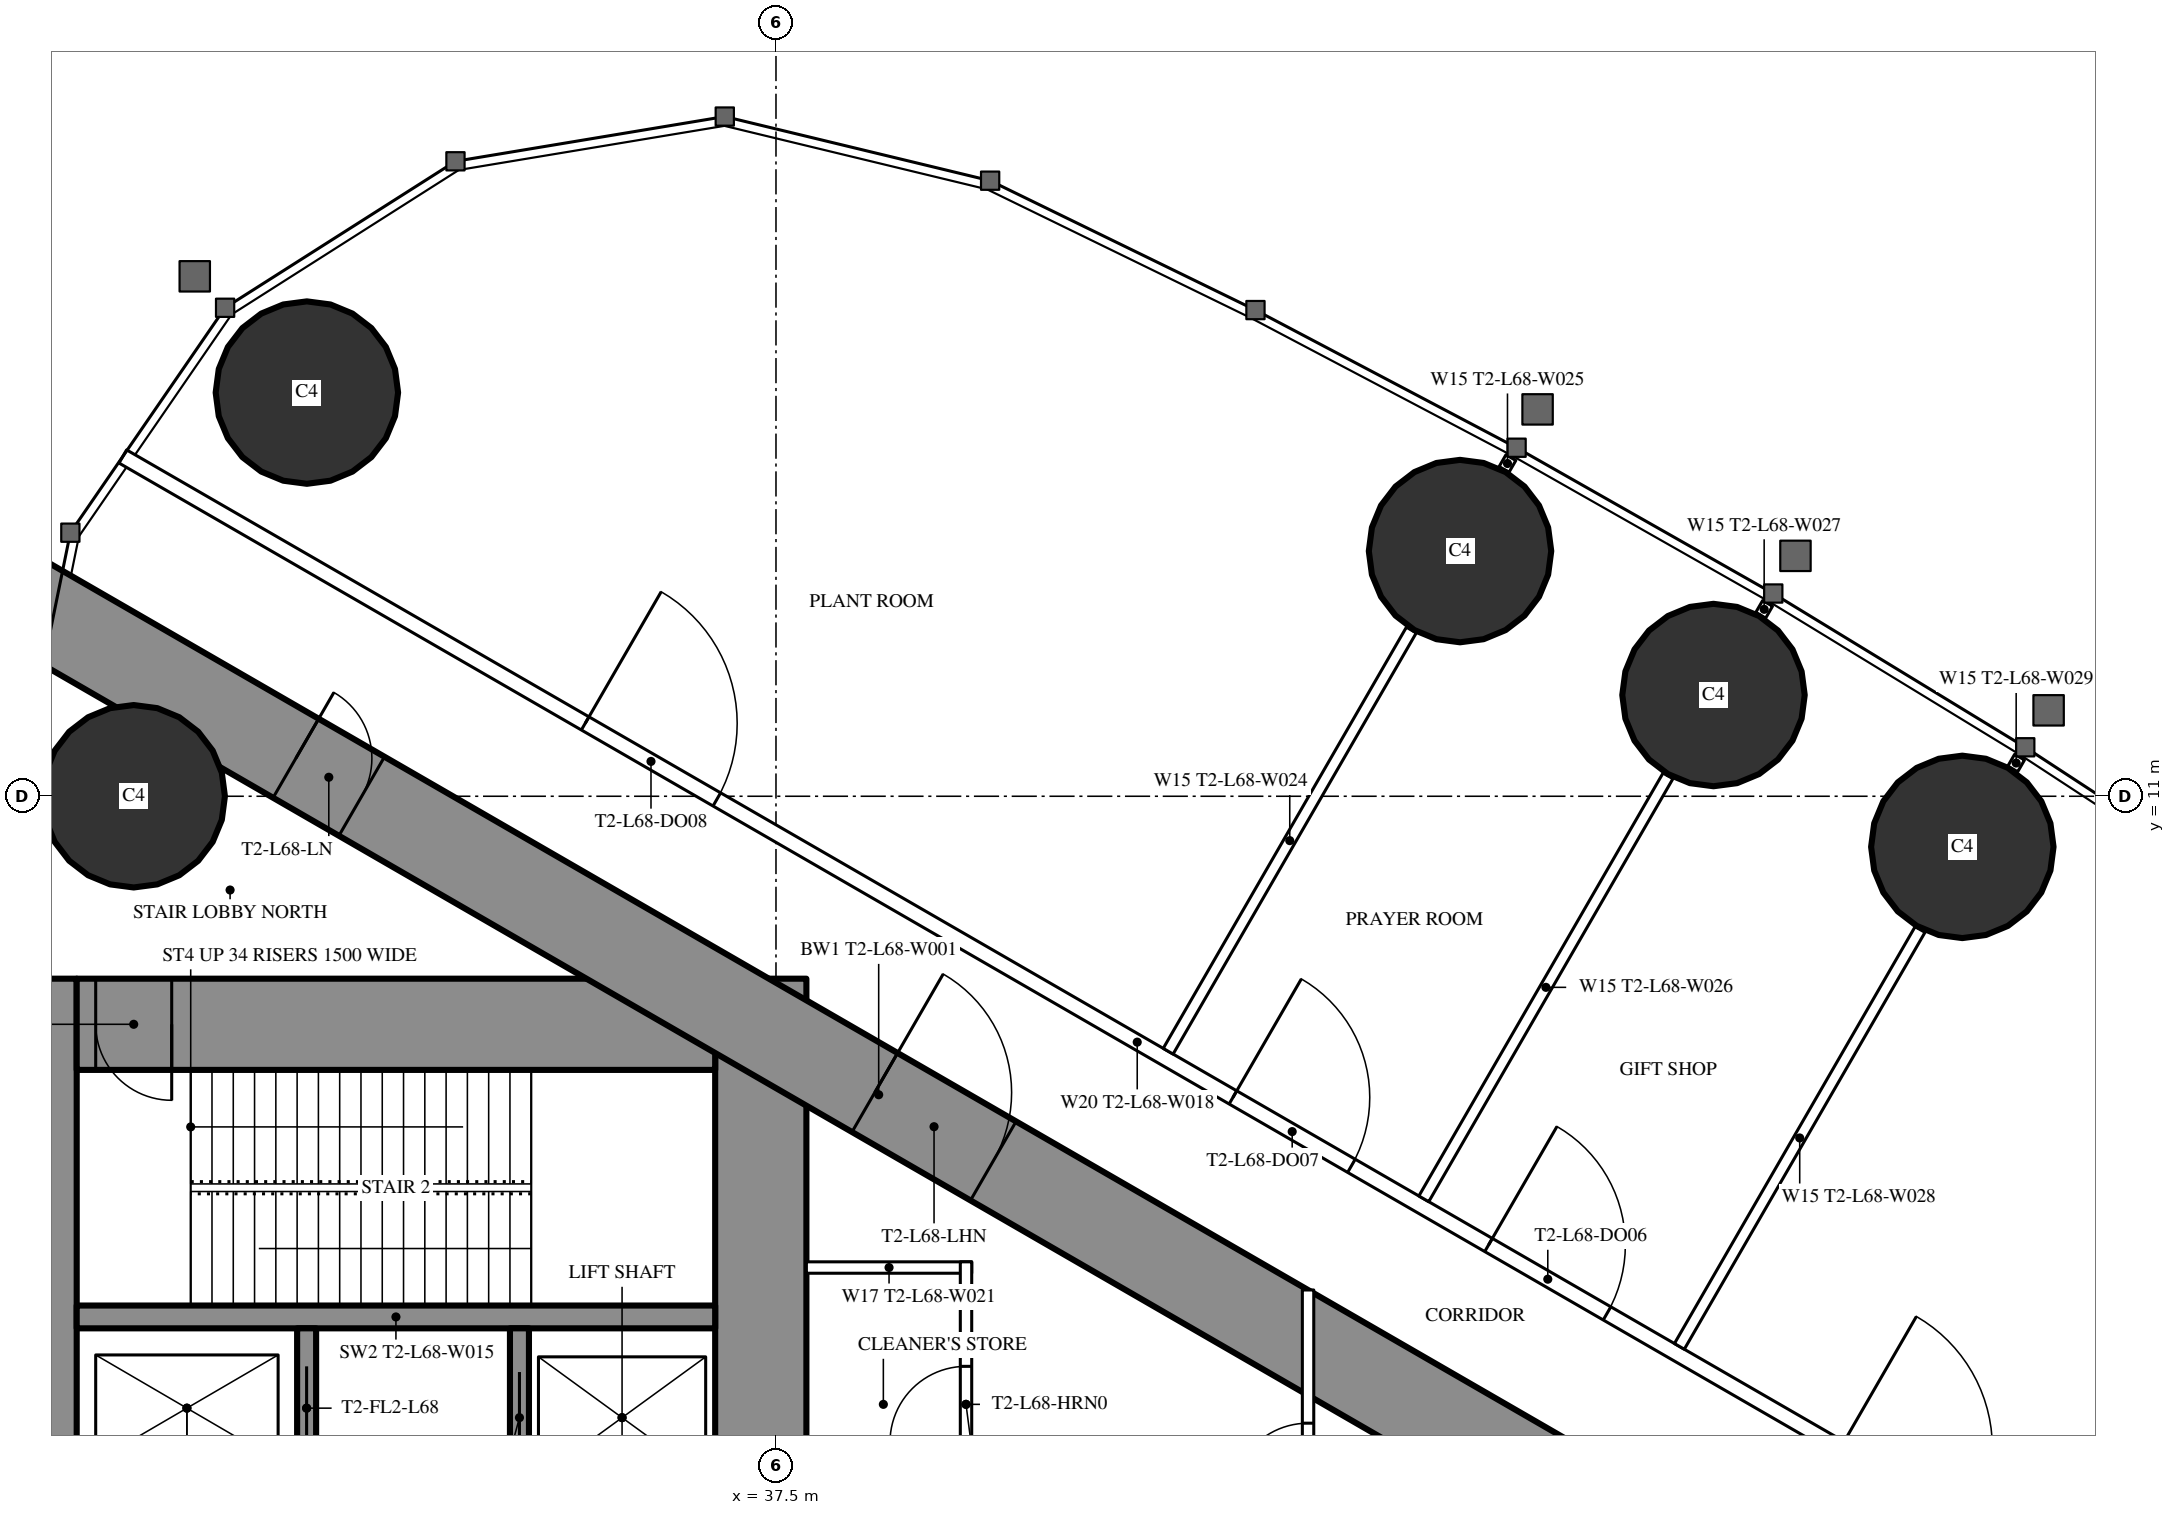
"""IFC4 building model, lengths in metres.
Left out: names, types, materials, properties, quantities, classifications, styles, units other than length and angle.
Written with IfcOpenShell. Run it as: python <this file> out.ifc"""

import sys

from ifc_helpers import new_model, si_unit, direction, frame, frame_2d, origin, origin_2d, place, context, subcontext, project, spatial, rectangle, circle, extrude, element, fill, save


model = new_model("IFC4")
c1 = context("Model", 3, precision=1e-05, world=origin(), true_north=direction((0.0, 1.0)))
c2 = subcontext(c1, "Body", "Model", "MODEL_VIEW")
j1 = project(units=[si_unit("LENGTHUNIT", "METRE"), si_unit("PLANEANGLEUNIT", "RADIAN")], contexts=[c1])
p1 = place(None, origin())
s1 = spatial("IfcSite", under=j1, at=p1, CompositionType="ELEMENT")
p2 = place(p1, origin())
s2 = spatial("IfcBuilding", under=s1, at=p2, CompositionType="ELEMENT")
p3 = place(p2, frame((0.0, 0.0, 257.3)))
s3 = spatial("IfcBuildingStorey", under=s2, at=p3, CompositionType="ELEMENT", Elevation=257.3)
for number, where, z_axis, x_axis in (
    (1, (31.328, 16.311, 0.0), (0.0, 0.0, 1.0), (1.0, 0.0, 0.0)),
    (2, (29.05, 11.0, 0.0), (0.0, 0.0, 1.0), (1.0, 0.0, 0.0)),
    (3, (53.108, 10.334, 0.0), (0.0, 0.0, 1.0), (1.0, 0.0, 0.0)),
    (4, (49.834, 12.332, 0.0), (0.0, 0.0, 1.0), (1.0, 0.0, 0.0)),
    (5, (46.499, 14.226, 0.0), (0.0, 0.0, 1.0), (1.0, 0.0, 0.0)),
):
    element("IfcColumn", number, at=place(p3, frame(where, z_axis=z_axis, x_axis=x_axis)), inside=s3, PredefinedType="COLUMN", context=c2, shape_type="SweptSolid", body=[
        extrude(circle(Radius=1.2, at=origin_2d()), origin(), (0.0, 0.0, 1.0), 6.0),
    ])
p4 = place(p3, frame((27.9, -8.6, 0.0), z_axis=(0.0, 0.0, 1.0), x_axis=(0.0, 1.0, 0.0)))
e6 = element("IfcWall", 6, at=p4, inside=s3, PredefinedType="SHEAR", context=c2, shape_type="SweptSolid", body=[
    extrude(rectangle(XDim=17.2, YDim=0.8, at=frame_2d((8.6, 0.0))), origin(), (0.0, 0.0, 1.0), 6.0),
])
p5 = place(p4, frame((9.35, 0.0, 0.0)))
e7 = element("IfcOpeningElement", 7, at=p5, cuts=e6, PredefinedType="OPENING", context=c2, shape_type="SweptSolid", body=[
    extrude(rectangle(XDim=0.9, YDim=2.2, at=frame_2d((0.45, 1.1))), frame((0.0, 0.41, 0.0), z_axis=(0.0, -1.0, 0.0), x_axis=(1.0, 0.0, 0.0)), (0.0, 0.0, 1.0), 0.82),
])
p6 = place(p3, frame((37.3, -8.6, 0.0), z_axis=(0.0, 0.0, 1.0), x_axis=(0.0, 1.0, 0.0)))
e8 = element("IfcWall", 8, at=p6, inside=s3, PredefinedType="SHEAR", context=c2, shape_type="SweptSolid", body=[
    extrude(rectangle(XDim=17.2, YDim=1.2, at=frame_2d((8.6, 0.0))), origin(), (0.0, 0.0, 1.0), 6.0),
])
p7 = place(p6, frame((7.7, 0.0, 0.0)))
e9 = element("IfcOpeningElement", 9, at=p7, cuts=e8, PredefinedType="OPENING", context=c2, shape_type="SweptSolid", body=[
    extrude(rectangle(XDim=1.8, YDim=2.2, at=frame_2d((0.9, 1.1))), frame((0.0, 0.61, 0.0), z_axis=(0.0, -1.0, 0.0), x_axis=(1.0, 0.0, 0.0)), (0.0, 0.0, 1.0), 1.22),
])
p8 = place(p3, frame((28.3, 8.0, 0.0), z_axis=(0.0, 0.0, 1.0), x_axis=(1.0, 0.0, 0.0)))
e10 = element("IfcWall", 10, at=p8, inside=s3, PredefinedType="SHEAR", context=c2, shape_type="SweptSolid", body=[
    extrude(rectangle(XDim=8.4, YDim=1.2, at=frame_2d((4.2, 0.0))), origin(), (0.0, 0.0, 1.0), 6.0),
])
p9 = place(p8, frame((0.25, 0.0, 0.0)))
e11 = element("IfcOpeningElement", 11, at=p9, cuts=e10, PredefinedType="OPENING", context=c2, shape_type="SweptSolid", body=[
    extrude(rectangle(XDim=1.0, YDim=2.2, at=frame_2d((0.5, 1.1))), frame((0.0, 0.61, 0.0), z_axis=(0.0, -1.0, 0.0), x_axis=(1.0, 0.0, 0.0)), (0.0, 0.0, 1.0), 1.22),
])
p10 = place(p3, frame((28.3, 4.15, 0.0), z_axis=(0.0, 0.0, 1.0), x_axis=(1.0, 0.0, 0.0)))
e12 = element("IfcWall", 12, at=p10, inside=s3, PredefinedType="SHEAR", context=c2, shape_type="SweptSolid", body=[
    extrude(rectangle(XDim=8.4, YDim=0.3, at=frame_2d((4.2, 0.0))), origin(), (0.0, 0.0, 1.0), 6.0),
])
p11 = place(p3, frame((31.325, 1.9, 0.0), z_axis=(0.0, 0.0, 1.0), x_axis=(0.0, 1.0, 0.0)))
e13 = element("IfcWall", 13, at=p11, inside=s3, PredefinedType="SHEAR", context=c2, shape_type="SweptSolid", body=[
    extrude(rectangle(XDim=2.1, YDim=0.25, at=frame_2d((1.05, 0.0))), origin(), (0.0, 0.0, 1.0), 6.0),
])
p12 = place(p11, frame((0.5, 0.0, 0.0)))
e14 = element("IfcOpeningElement", 14, at=p12, cuts=e13, PredefinedType="OPENING", context=c2, shape_type="SweptSolid", body=[
    extrude(rectangle(XDim=1.1, YDim=2.2, at=frame_2d((0.55, 1.1))), frame((0.0, 0.135, 0.0), z_axis=(0.0, -1.0, 0.0), x_axis=(1.0, 0.0, 0.0)), (0.0, 0.0, 1.0), 0.27),
])
p13 = place(p3, frame((34.125, 1.65, 0.0), z_axis=(0.0, 0.0, 1.0), x_axis=(0.0, 1.0, 0.0)))
e15 = element("IfcWall", 15, at=p13, inside=s3, PredefinedType="SHEAR", context=c2, shape_type="SweptSolid", body=[
    extrude(rectangle(XDim=2.35, YDim=0.25, at=frame_2d((1.175, 0.0))), origin(), (0.0, 0.0, 1.0), 6.0),
])
p14 = place(p13, frame((0.575, 0.0, 0.0)))
e16 = element("IfcOpeningElement", 16, at=p14, cuts=e15, PredefinedType="OPENING", context=c2, shape_type="SweptSolid", body=[
    extrude(rectangle(XDim=1.2, YDim=2.2, at=frame_2d((0.6, 1.1))), frame((0.0, 0.135, 0.0), z_axis=(0.0, -1.0, 0.0), x_axis=(1.0, 0.0, 0.0)), (0.0, 0.0, 1.0), 0.27),
])
p15 = place(p3, frame((27.2, 13.8, 0.0), z_axis=(0.0, 0.0, 1.0), x_axis=(0.866024515034, -0.500001539357, 0.0)))
e17 = element("IfcWall", 17, at=p15, inside=s3, PredefinedType="SHEAR", context=c2, shape_type="SweptSolid", body=[
    extrude(rectangle(XDim=26.907, YDim=1.2, at=frame_2d((13.454, 0.0))), origin(), (0.0, 0.0, 1.0), 6.0),
])
p16 = place(p15, frame((4.6, 0.0, 0.0)))
e18 = element("IfcOpeningElement", 18, at=p16, cuts=e17, PredefinedType="OPENING", context=c2, shape_type="SweptSolid", body=[
    extrude(rectangle(XDim=1.0, YDim=2.2, at=frame_2d((0.5, 1.1))), frame((0.0, 0.61, 0.0), z_axis=(0.0, -1.0, 0.0), x_axis=(1.0, 0.0, 0.0)), (0.0, 0.0, 1.0), 1.22),
])
p17 = place(p15, frame((13.395, 0.0, 0.0)))
e19 = element("IfcOpeningElement", 19, at=p17, cuts=e17, PredefinedType="OPENING", context=c2, shape_type="SweptSolid", body=[
    extrude(rectangle(XDim=1.8, YDim=2.2, at=frame_2d((0.9, 1.1))), frame((0.0, 0.61, 0.0), z_axis=(0.0, -1.0, 0.0), x_axis=(1.0, 0.0, 0.0)), (0.0, 0.0, 1.0), 1.22),
])
p18 = place(p3, frame((28.907, 15.47, 0.0), z_axis=(0.0, 0.0, 1.0), x_axis=(0.866025841386, -0.499999242051, 0.0)))
e20 = element("IfcWall", 20, at=p18, inside=s3, PredefinedType="PARTITIONING", context=c2, shape_type="SweptSolid", body=[
    extrude(rectangle(XDim=30.821, YDim=0.2, at=frame_2d((15.41, 0.0))), origin(), (0.0, 0.0, 1.0), 5.75),
])
p19 = place(p18, frame((26.092, 0.0, 0.0)))
e21 = element("IfcOpeningElement", 21, at=p19, cuts=e20, PredefinedType="OPENING", context=c2, shape_type="SweptSolid", body=[
    extrude(rectangle(XDim=2.0, YDim=2.4, at=frame_2d((1.0, 1.2))), frame((0.0, 0.11, 0.0), z_axis=(0.0, -1.0, 0.0), x_axis=(1.0, 0.0, 0.0)), (0.0, 0.0, 1.0), 0.22),
])
p20 = place(p18, frame((20.748, 0.0, 0.0)))
e22 = element("IfcOpeningElement", 22, at=p20, cuts=e20, PredefinedType="OPENING", context=c2, shape_type="SweptSolid", body=[
    extrude(rectangle(XDim=1.8, YDim=2.2, at=frame_2d((0.9, 1.1))), frame((0.0, 0.11, 0.0), z_axis=(0.0, -1.0, 0.0), x_axis=(1.0, 0.0, 0.0)), (0.0, 0.0, 1.0), 0.22),
])
p21 = place(p18, frame((16.865, 0.0, 0.0)))
e23 = element("IfcOpeningElement", 23, at=p21, cuts=e20, PredefinedType="OPENING", context=c2, shape_type="SweptSolid", body=[
    extrude(rectangle(XDim=1.8, YDim=2.2, at=frame_2d((0.9, 1.1))), frame((0.0, 0.11, 0.0), z_axis=(0.0, -1.0, 0.0), x_axis=(1.0, 0.0, 0.0)), (0.0, 0.0, 1.0), 0.22),
])
p22 = place(p18, frame((7.024, 0.0, 0.0)))
e24 = element("IfcOpeningElement", 24, at=p22, cuts=e20, PredefinedType="OPENING", context=c2, shape_type="SweptSolid", body=[
    extrude(rectangle(XDim=2.0, YDim=2.4, at=frame_2d((1.0, 1.2))), frame((0.0, 0.11, 0.0), z_axis=(0.0, -1.0, 0.0), x_axis=(1.0, 0.0, 0.0)), (0.0, 0.0, 1.0), 0.22),
])
p23 = place(p3, frame((42.66, 7.646, 0.0), z_axis=(0.0, 0.0, 1.0), x_axis=(0.499996592859, 0.866027370889, 0.0)))
e25 = element("IfcWall", 25, at=p23, inside=s3, PredefinedType="PARTITIONING", context=c2, shape_type="SweptSolid", body=[
    extrude(rectangle(XDim=6.398, YDim=0.15, at=frame_2d((3.199, 0.0))), origin(), (0.0, 0.0, 1.0), 4.85),
])
p24 = place(p3, frame((47.079, 15.3, 0.0), z_axis=(0.0, 0.0, 1.0), x_axis=(0.499212083968, 0.866479829667, 0.0)))
e26 = element("IfcWall", 26, at=p24, inside=s3, PredefinedType="PARTITIONING", context=c2, shape_type="SweptSolid", body=[
    extrude(rectangle(XDim=0.179, YDim=0.15, at=frame_2d((0.09, 0.0))), origin(), (0.0, 0.0, 1.0), 4.85),
])
p25 = place(p3, frame((46.023, 5.704, 0.0), z_axis=(0.0, 0.0, 1.0), x_axis=(0.499984478165, 0.866034365135, 0.0)))
e27 = element("IfcWall", 27, at=p25, inside=s3, PredefinedType="PARTITIONING", context=c2, shape_type="SweptSolid", body=[
    extrude(rectangle(XDim=6.426, YDim=0.15, at=frame_2d((3.213, 0.0))), origin(), (0.0, 0.0, 1.0), 4.85),
])
p26 = place(p3, frame((50.456, 13.382, 0.0), z_axis=(0.0, 0.0, 1.0), x_axis=(0.500661834965, 0.865642955848, 0.0)))
e28 = element("IfcWall", 28, at=p26, inside=s3, PredefinedType="PARTITIONING", context=c2, shape_type="SweptSolid", body=[
    extrude(rectangle(XDim=0.18, YDim=0.15, at=frame_2d((0.09, 0.0))), origin(), (0.0, 0.0, 1.0), 4.85),
])
p27 = place(p3, frame((49.385, 3.763, 0.0), z_axis=(0.0, 0.0, 1.0), x_axis=(0.499999447814, 0.866025722589, 0.0)))
e29 = element("IfcWall", 29, at=p27, inside=s3, PredefinedType="PARTITIONING", context=c2, shape_type="SweptSolid", body=[
    extrude(rectangle(XDim=6.333, YDim=0.15, at=frame_2d((3.166, 0.0))), origin(), (0.0, 0.0, 1.0), 4.85),
])
p28 = place(p3, frame((53.771, 11.36, 0.0), z_axis=(0.0, 0.0, 1.0), x_axis=(0.499524978789, 0.866299483762, 0.0)))
e30 = element("IfcWall", 30, at=p28, inside=s3, PredefinedType="PARTITIONING", context=c2, shape_type="SweptSolid", body=[
    extrude(rectangle(XDim=0.178, YDim=0.15, at=frame_2d((0.089, 0.0))), origin(), (0.0, 0.0, 1.0), 4.85),
])
p29 = place(p3, frame((37.9, 4.8, 0.0), z_axis=(0.0, 0.0, 1.0), x_axis=(1.0, 0.0, 0.0)))
e31 = element("IfcWall", 31, at=p29, inside=s3, PredefinedType="PARTITIONING", context=c2, shape_type="SweptSolid", body=[
    extrude(rectangle(XDim=2.175, YDim=0.15, at=frame_2d((1.087, 0.0))), origin(), (0.0, 0.0, 1.0), 5.75),
])
p30 = place(p3, frame((40.0, 1.125, 0.0), z_axis=(0.0, 0.0, 1.0), x_axis=(0.0, 1.0, 0.0)))
e32 = element("IfcWall", 32, at=p30, inside=s3, PredefinedType="PARTITIONING", context=c2, shape_type="SweptSolid", body=[
    extrude(rectangle(XDim=3.75, YDim=0.15, at=frame_2d((1.875, 0.0))), origin(), (0.0, 0.0, 1.0), 5.75),
])
p31 = place(p30, frame((1.375, 0.0, 0.0)))
e33 = element("IfcOpeningElement", 33, at=p31, cuts=e32, PredefinedType="OPENING", context=c2, shape_type="SweptSolid", body=[
    extrude(rectangle(XDim=1.0, YDim=2.2, at=frame_2d((0.5, 1.1))), frame((0.0, 0.085, 0.0), z_axis=(0.0, -1.0, 0.0), x_axis=(1.0, 0.0, 0.0)), (0.0, 0.0, 1.0), 0.17),
])
p32 = place(p3, frame((44.5, -4.505, 0.0), z_axis=(0.0, 0.0, 1.0), x_axis=(0.0, 1.0, 0.0)))
e34 = element("IfcWall", 34, at=p32, inside=s3, PredefinedType="PARTITIONING", context=c2, shape_type="SweptSolid", body=[
    extrude(rectangle(XDim=9.009, YDim=0.15, at=frame_2d((4.505, 0.0))), origin(), (0.0, 0.0, 1.0), 5.75),
])
p33 = place(p32, frame((1.752, 0.0, 0.0)))
e35 = element("IfcOpeningElement", 35, at=p33, cuts=e34, PredefinedType="OPENING", context=c2, shape_type="SweptSolid", body=[
    extrude(rectangle(XDim=1.0, YDim=2.2, at=frame_2d((0.5, 1.1))), frame((0.0, 0.085, 0.0), z_axis=(0.0, -1.0, 0.0), x_axis=(1.0, 0.0, 0.0)), (0.0, 0.0, 1.0), 0.17),
])
p34 = place(p32, frame((6.257, 0.0, 0.0)))
e36 = element("IfcOpeningElement", 36, at=p34, cuts=e34, PredefinedType="OPENING", context=c2, shape_type="SweptSolid", body=[
    extrude(rectangle(XDim=1.0, YDim=2.2, at=frame_2d((0.5, 1.1))), frame((0.0, 0.085, 0.0), z_axis=(0.0, -1.0, 0.0), x_axis=(1.0, 0.0, 0.0)), (0.0, 0.0, 1.0), 0.17),
])
p35 = place(p20, origin())
e37 = element("IfcDoor", 37, at=p35, inside=s3, OperationType="DOUBLE_DOOR_SINGLE_SWING", PredefinedType="DOOR", context=c2, shape_type="SweptSolid", body=[
    extrude(rectangle(XDim=1.8, YDim=2.2, at=frame_2d((0.9, 1.1))), frame((0.0, 0.025, 0.0), z_axis=(0.0, -1.0, 0.0), x_axis=(1.0, 0.0, 0.0)), (0.0, 0.0, 1.0), 0.05),
])
fill(e22, e37)
p36 = place(p21, origin())
e38 = element("IfcDoor", 38, at=p36, inside=s3, OperationType="DOUBLE_DOOR_SINGLE_SWING", PredefinedType="DOOR", context=c2, shape_type="SweptSolid", body=[
    extrude(rectangle(XDim=1.8, YDim=2.2, at=frame_2d((0.9, 1.1))), frame((0.0, 0.025, 0.0), z_axis=(0.0, -1.0, 0.0), x_axis=(1.0, 0.0, 0.0)), (0.0, 0.0, 1.0), 0.05),
])
fill(e23, e38)
p37 = place(p22, origin())
e39 = element("IfcDoor", 39, at=p37, inside=s3, OperationType="DOUBLE_DOOR_SINGLE_SWING", PredefinedType="DOOR", context=c2, shape_type="SweptSolid", body=[
    extrude(rectangle(XDim=2.0, YDim=2.4, at=frame_2d((1.0, 1.2))), frame((0.0, 0.025, 0.0), z_axis=(0.0, -1.0, 0.0), x_axis=(1.0, 0.0, 0.0)), (0.0, 0.0, 1.0), 0.05),
])
fill(e24, e39)
p38 = place(p31, origin())
e40 = element("IfcDoor", 40, at=p38, inside=s3, OperationType="SINGLE_SWING_LEFT", PredefinedType="DOOR", context=c2, shape_type="SweptSolid", body=[
    extrude(rectangle(XDim=1.0, YDim=2.2, at=frame_2d((0.5, 1.1))), frame((0.0, 0.025, 0.0), z_axis=(0.0, -1.0, 0.0), x_axis=(1.0, 0.0, 0.0)), (0.0, 0.0, 1.0), 0.05),
])
fill(e33, e40)
p39 = place(p34, origin())
e41 = element("IfcDoor", 41, at=p39, inside=s3, OperationType="SINGLE_SWING_LEFT", PredefinedType="DOOR", context=c2, shape_type="SweptSolid", body=[
    extrude(rectangle(XDim=1.0, YDim=2.2, at=frame_2d((0.5, 1.1))), frame((0.0, 0.025, 0.0), z_axis=(0.0, -1.0, 0.0), x_axis=(1.0, 0.0, 0.0)), (0.0, 0.0, 1.0), 0.05),
])
fill(e36, e41)
p40 = place(p16, origin())
e42 = element("IfcDoor", 42, at=p40, inside=s3, OperationType="SINGLE_SWING_LEFT", PredefinedType="DOOR", context=c2, shape_type="SweptSolid", body=[
    extrude(rectangle(XDim=1.0, YDim=2.2, at=frame_2d((0.5, 1.1))), frame((0.0, 0.025, 0.0), z_axis=(0.0, -1.0, 0.0), x_axis=(1.0, 0.0, 0.0)), (0.0, 0.0, 1.0), 0.05),
])
fill(e18, e42)
p41 = place(p17, origin())
e43 = element("IfcDoor", 43, at=p41, inside=s3, OperationType="DOUBLE_DOOR_SINGLE_SWING", PredefinedType="DOOR", context=c2, shape_type="SweptSolid", body=[
    extrude(rectangle(XDim=1.8, YDim=2.2, at=frame_2d((0.9, 1.1))), frame((0.0, 0.025, 0.0), z_axis=(0.0, -1.0, 0.0), x_axis=(1.0, 0.0, 0.0)), (0.0, 0.0, 1.0), 0.05),
])
fill(e19, e43)
p42 = place(p9, origin())
e44 = element("IfcDoor", 44, at=p42, inside=s3, OperationType="SINGLE_SWING_RIGHT", PredefinedType="DOOR", context=c2, shape_type="SweptSolid", body=[
    extrude(rectangle(XDim=1.0, YDim=2.2, at=frame_2d((0.5, 1.1))), frame((0.0, 0.025, 0.0), z_axis=(0.0, -1.0, 0.0), x_axis=(1.0, 0.0, 0.0)), (0.0, 0.0, 1.0), 0.05),
])
fill(e11, e44)
p43 = place(p12, origin())
e45 = element("IfcDoor", 45, at=p43, inside=s3, OperationType="SLIDING_TO_LEFT", PredefinedType="USERDEFINED", context=c2, shape_type="SweptSolid", body=[
    extrude(rectangle(XDim=1.1, YDim=2.2, at=frame_2d((0.55, 1.1))), frame((0.0, 0.025, 0.0), z_axis=(0.0, -1.0, 0.0), x_axis=(1.0, 0.0, 0.0)), (0.0, 0.0, 1.0), 0.05),
])
fill(e14, e45)
p44 = place(p14, origin())
e46 = element("IfcDoor", 46, at=p44, inside=s3, OperationType="DOUBLE_DOOR_SLIDING", PredefinedType="USERDEFINED", context=c2, shape_type="SweptSolid", body=[
    extrude(rectangle(XDim=1.2, YDim=2.2, at=frame_2d((0.6, 1.1))), frame((0.0, 0.025, 0.0), z_axis=(0.0, -1.0, 0.0), x_axis=(1.0, 0.0, 0.0)), (0.0, 0.0, 1.0), 0.05),
])
fill(e16, e46)
save(model, sys.argv[1])
